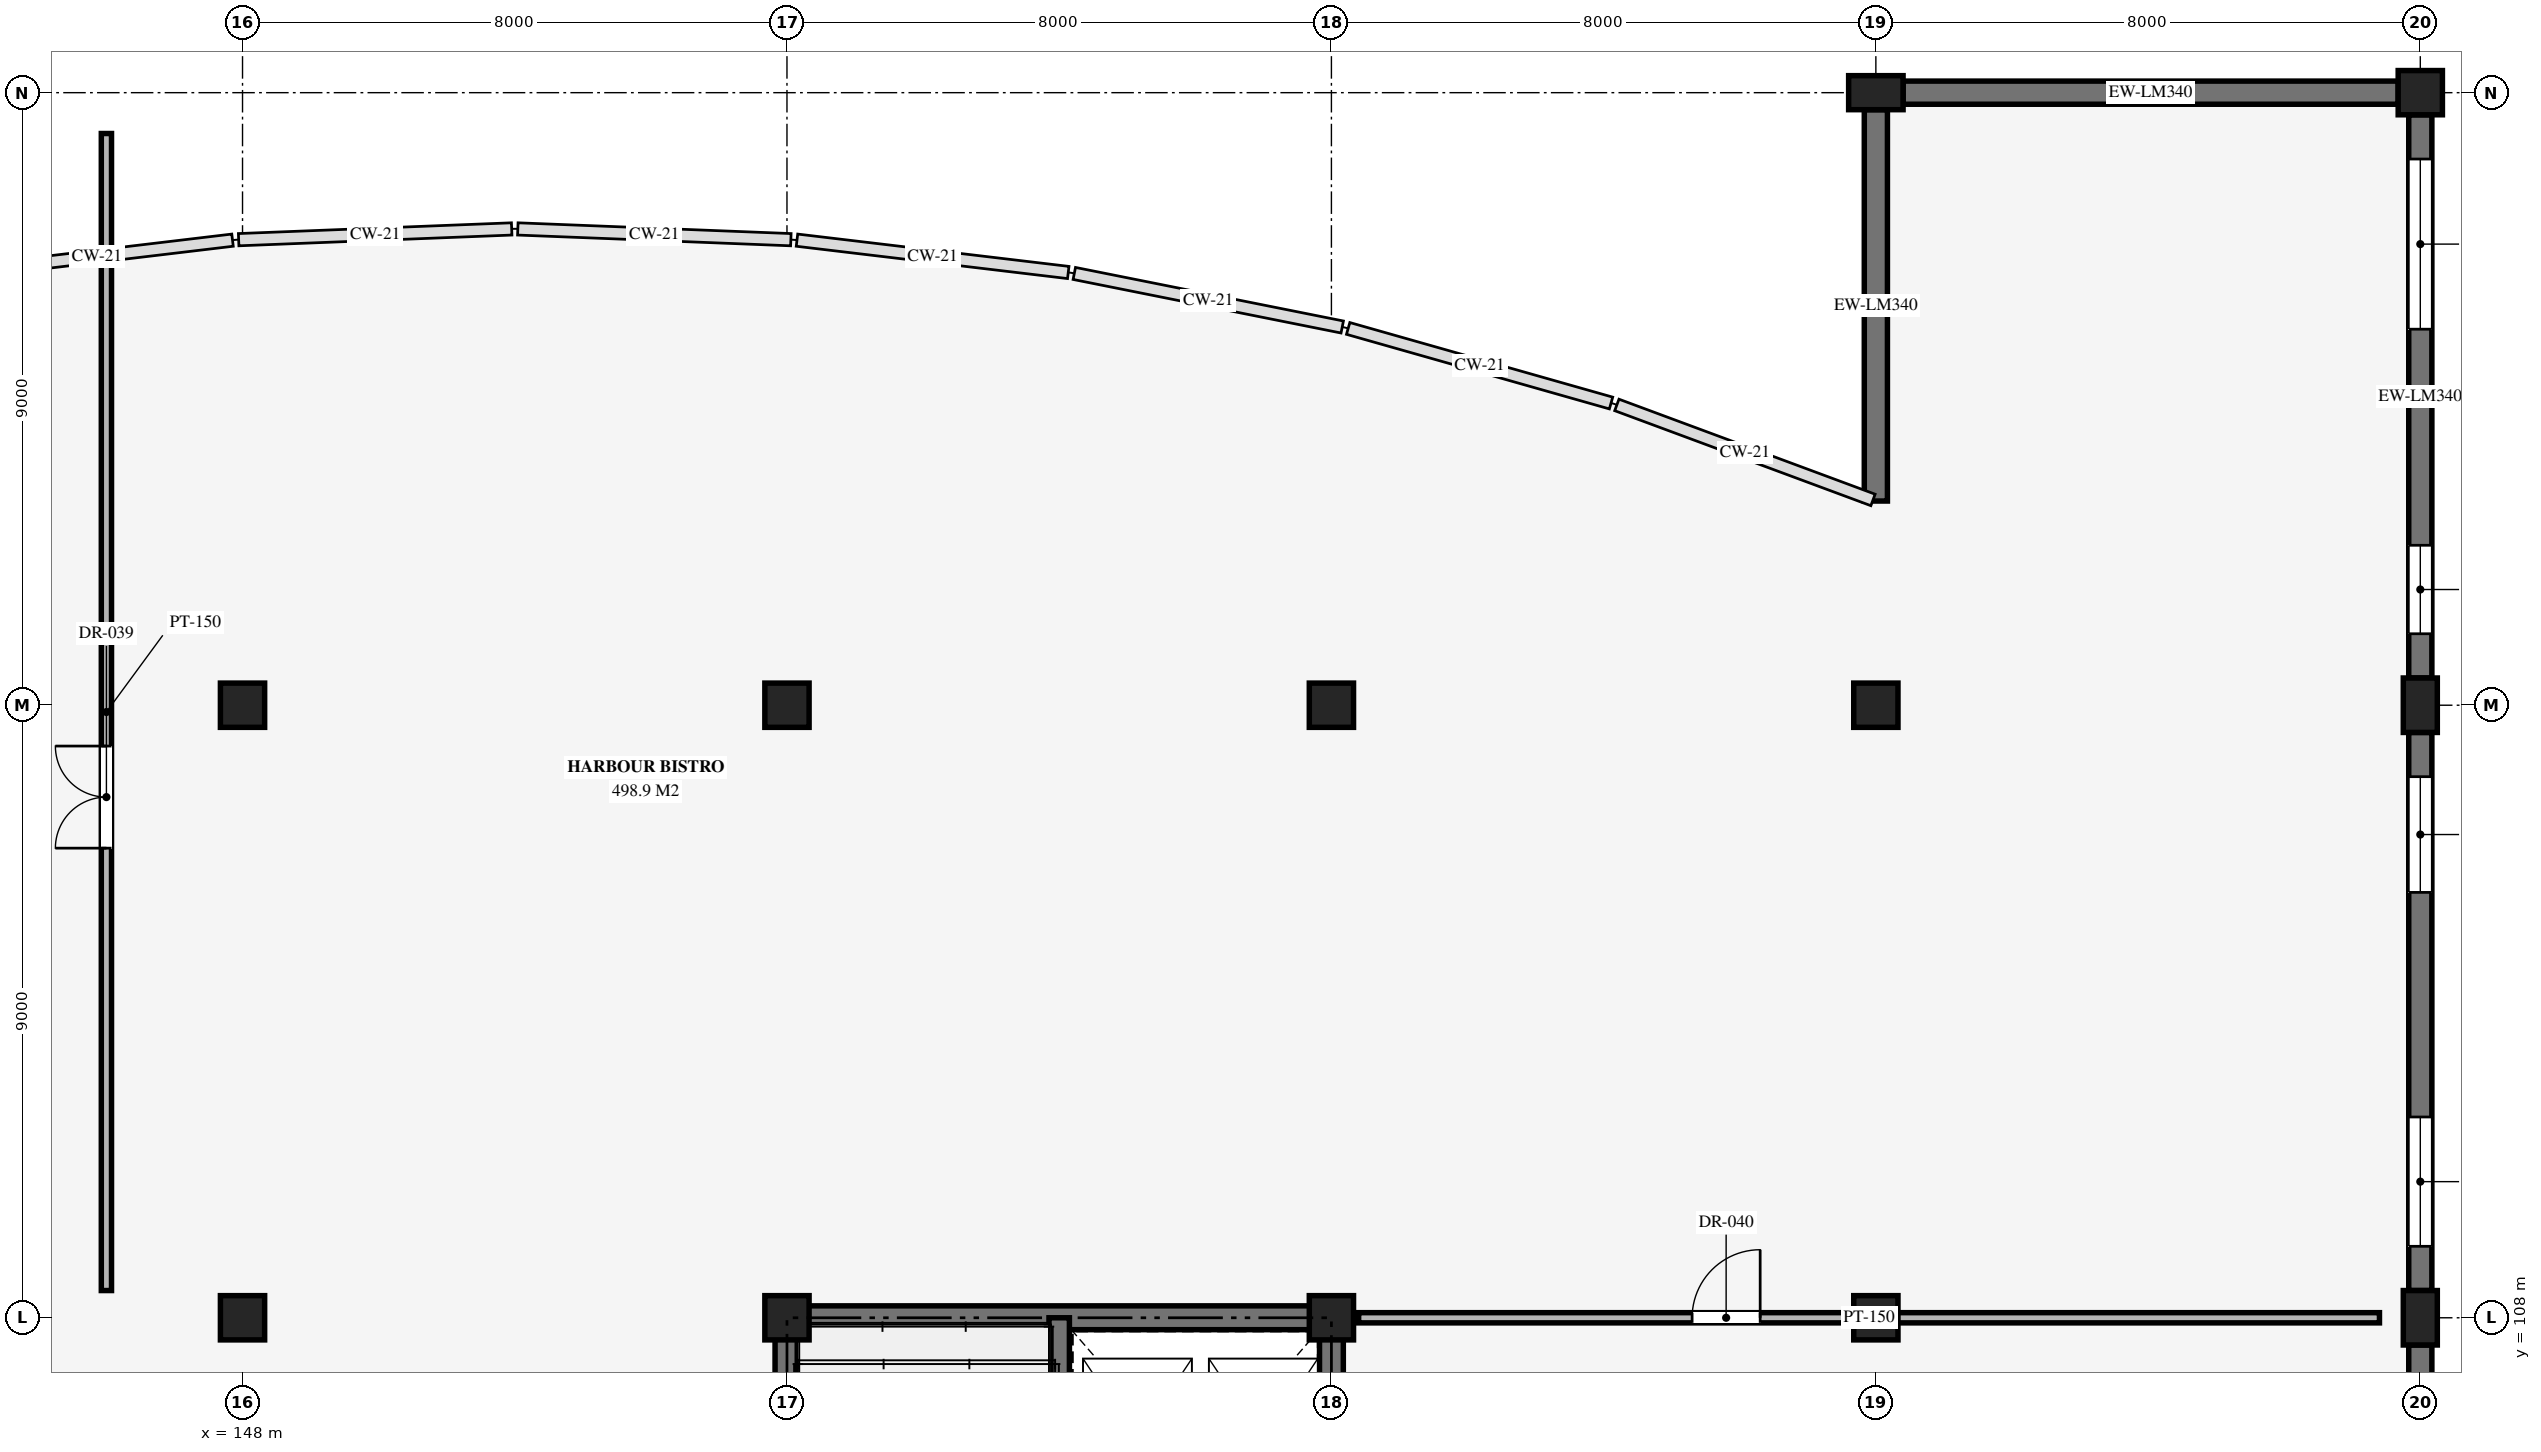
"""IFC4 building model, lengths in metres.
Left out: names, types, materials, properties, quantities, classifications, styles, units other than length and angle.
Written with IfcOpenShell. Run it as: python <this file> out.ifc"""

import sys

from ifc_helpers import new_model, si_unit, direction, frame, frame_2d, origin, origin_2d, place, context, subcontext, project, spatial, rectangle, extrude, element, fill, save


model = new_model("IFC4")
c1 = context("Model", 3, precision=1e-05, world=origin(), true_north=direction((0.0, 1.0)))
c2 = subcontext(c1, "Body", "Model", "MODEL_VIEW")
j1 = project(units=[si_unit("LENGTHUNIT", "METRE"), si_unit("PLANEANGLEUNIT", "RADIAN")], contexts=[c1])
p1 = place(None, origin())
s1 = spatial("IfcSite", under=j1, at=p1, CompositionType="ELEMENT")
p2 = place(p1, origin())
s2 = spatial("IfcBuilding", under=s1, at=p2, CompositionType="ELEMENT")
p3 = place(p2, frame((0.0, 0.0, 10.2)))
s3 = spatial("IfcBuildingStorey", under=s2, at=p3, CompositionType="ELEMENT", Elevation=10.2)
for number, where, z_axis, x_axis in (
    (1, (148.0, 108.0, 0.0), (0.0, 0.0, 1.0), (1.0, 0.0, 0.0)),
    (2, (148.0, 117.0, 0.0), (0.0, 0.0, 1.0), (1.0, 0.0, 0.0)),
    (3, (156.0, 108.0, 0.0), (0.0, 0.0, 1.0), (1.0, 0.0, 0.0)),
    (4, (156.0, 117.0, 0.0), (0.0, 0.0, 1.0), (1.0, 0.0, 0.0)),
    (5, (164.0, 108.0, 0.0), (0.0, 0.0, 1.0), (1.0, 0.0, 0.0)),
    (6, (164.0, 117.0, 0.0), (0.0, 0.0, 1.0), (1.0, 0.0, 0.0)),
    (7, (172.0, 108.0, 0.0), (0.0, 0.0, 1.0), (1.0, 0.0, 0.0)),
    (8, (172.0, 117.0, 0.0), (0.0, 0.0, 1.0), (1.0, 0.0, 0.0)),
):
    element("IfcColumn", number, at=place(p3, frame(where, z_axis=z_axis, x_axis=x_axis)), inside=s3, PredefinedType="COLUMN", context=c2, shape_type="SweptSolid", body=[
        extrude(rectangle(XDim=0.65, YDim=0.65, at=origin_2d()), origin(), (0.0, 0.0, 1.0), 4.64),
    ])
for number, where, z_axis, x_axis in (
    (9, (172.0, 126.0, 0.0), (0.0, 0.0, 1.0), (0.0, 1.0, 0.0)),
    (10, (180.0, 108.0, 0.0), (0.0, 0.0, 1.0), (1.0, 0.0, 0.0)),
    (11, (180.0, 117.0, 0.0), (0.0, 0.0, 1.0), (1.0, 0.0, 0.0)),
):
    element("IfcColumn", number, at=place(p3, frame(where, z_axis=z_axis, x_axis=x_axis)), inside=s3, PredefinedType="PILASTER", context=c2, shape_type="SweptSolid", body=[
        extrude(rectangle(XDim=0.5, YDim=0.8, at=origin_2d()), origin(), (0.0, 0.0, 1.0), 4.64),
    ])
p4 = place(p3, frame((180.0, 126.0, 0.0), z_axis=(0.0, 0.0, 1.0), x_axis=(1.0, 0.0, 0.0)))
e12 = element("IfcColumn", 12, at=p4, inside=s3, PredefinedType="COLUMN", context=c2, shape_type="SweptSolid", body=[
    extrude(rectangle(XDim=0.65, YDim=0.65, at=origin_2d()), origin(), (0.0, 0.0, 1.0), 4.64),
])
p5 = place(p3, frame((180.0, 99.4, 0.0), z_axis=(0.0, 0.0, 1.0), x_axis=(0.0, 1.0, 0.0)))
e13 = element("IfcWall", 13, at=p5, inside=s3, PredefinedType="SOLIDWALL", context=c2, shape_type="SweptSolid", body=[
    extrude(rectangle(XDim=8.2, YDim=0.34, at=frame_2d((4.1, 0.0))), origin(), (0.0, 0.0, 1.0), 4.52),
])
p6 = place(p5, frame((0.65, 0.0, 0.95)))
e14 = element("IfcOpeningElement", 14, at=p6, cuts=e13, PredefinedType="OPENING", context=c2, shape_type="SweptSolid", body=[
    extrude(rectangle(XDim=1.6, YDim=2.0, at=frame_2d((0.8, 1.0))), frame((0.0, 0.18, 0.0), z_axis=(0.0, -1.0, 0.0), x_axis=(1.0, 0.0, 0.0)), (0.0, 0.0, 1.0), 0.36),
])
p7 = place(p5, frame((5.35, 0.0, 0.95)))
e15 = element("IfcOpeningElement", 15, at=p7, cuts=e13, PredefinedType="OPENING", context=c2, shape_type="SweptSolid", body=[
    extrude(rectangle(XDim=2.2, YDim=1.9, at=frame_2d((1.1, 0.95))), frame((0.0, 0.18, 0.0), z_axis=(0.0, -1.0, 0.0), x_axis=(1.0, 0.0, 0.0)), (0.0, 0.0, 1.0), 0.36),
])
p8 = place(p3, frame((180.0, 108.4, 0.0), z_axis=(0.0, 0.0, 1.0), x_axis=(0.0, 1.0, 0.0)))
e16 = element("IfcWall", 16, at=p8, inside=s3, PredefinedType="SOLIDWALL", context=c2, shape_type="SweptSolid", body=[
    extrude(rectangle(XDim=8.2, YDim=0.34, at=frame_2d((4.1, 0.0))), origin(), (0.0, 0.0, 1.0), 4.52),
])
p9 = place(p8, frame((0.65, 0.0, 0.95)))
e17 = element("IfcOpeningElement", 17, at=p9, cuts=e16, PredefinedType="OPENING", context=c2, shape_type="SweptSolid", body=[
    extrude(rectangle(XDim=1.9, YDim=1.9, at=frame_2d((0.95, 0.95))), frame((0.0, 0.18, 0.0), z_axis=(0.0, -1.0, 0.0), x_axis=(1.0, 0.0, 0.0)), (0.0, 0.0, 1.0), 0.36),
])
p10 = place(p8, frame((5.85, 0.0, 0.95)))
e18 = element("IfcOpeningElement", 18, at=p10, cuts=e16, PredefinedType="OPENING", context=c2, shape_type="SweptSolid", body=[
    extrude(rectangle(XDim=1.7, YDim=1.7, at=frame_2d((0.85, 0.85))), frame((0.0, 0.18, 0.0), z_axis=(0.0, -1.0, 0.0), x_axis=(1.0, 0.0, 0.0)), (0.0, 0.0, 1.0), 0.36),
])
p11 = place(p3, frame((180.0, 117.4, 0.0), z_axis=(0.0, 0.0, 1.0), x_axis=(0.0, 1.0, 0.0)))
e19 = element("IfcWall", 19, at=p11, inside=s3, PredefinedType="SOLIDWALL", context=c2, shape_type="SweptSolid", body=[
    extrude(rectangle(XDim=8.275, YDim=0.34, at=frame_2d((4.138, 0.0))), origin(), (0.0, 0.0, 1.0), 4.52),
])
p12 = place(p11, frame((0.65, 0.0, 0.95)))
e20 = element("IfcOpeningElement", 20, at=p12, cuts=e19, PredefinedType="OPENING", context=c2, shape_type="SweptSolid", body=[
    extrude(rectangle(XDim=1.3, YDim=1.9, at=frame_2d((0.65, 0.95))), frame((0.0, 0.18, 0.0), z_axis=(0.0, -1.0, 0.0), x_axis=(1.0, 0.0, 0.0)), (0.0, 0.0, 1.0), 0.36),
])
p13 = place(p11, frame((5.125, 0.0, 0.95)))
e21 = element("IfcOpeningElement", 21, at=p13, cuts=e19, PredefinedType="OPENING", context=c2, shape_type="SweptSolid", body=[
    extrude(rectangle(XDim=2.5, YDim=1.7, at=frame_2d((1.25, 0.85))), frame((0.0, 0.18, 0.0), z_axis=(0.0, -1.0, 0.0), x_axis=(1.0, 0.0, 0.0)), (0.0, 0.0, 1.0), 0.36),
])
p14 = place(p3, frame((172.0, 120.0, 0.0), z_axis=(0.0, 0.0, 1.0), x_axis=(0.0, 1.0, 0.0)))
e22 = element("IfcWall", 22, at=p14, inside=s3, PredefinedType="SOLIDWALL", context=c2, shape_type="SweptSolid", body=[
    extrude(rectangle(XDim=5.75, YDim=0.34, at=frame_2d((2.875, 0.0))), origin(), (0.0, 0.0, 1.0), 4.52),
])
p15 = place(p3, frame((172.4, 126.0, 0.0), z_axis=(0.0, 0.0, 1.0), x_axis=(1.0, 0.0, 0.0)))
e23 = element("IfcWall", 23, at=p15, inside=s3, PredefinedType="SOLIDWALL", context=c2, shape_type="SweptSolid", body=[
    extrude(rectangle(XDim=7.275, YDim=0.34, at=frame_2d((3.638, 0.0))), origin(), (0.0, 0.0, 1.0), 4.52),
])
p16 = place(p3, frame((156.0, 108.0, 0.0), z_axis=(0.0, 0.0, 1.0), x_axis=(1.0, 0.0, 0.0)))
e24 = element("IfcWall", 24, at=p16, inside=s3, PredefinedType="SHEAR", context=c2, shape_type="SweptSolid", body=[
    extrude(rectangle(XDim=8.0, YDim=0.35, at=frame_2d((4.0, 0.0))), origin(), (0.0, 0.0, 1.0), 4.78),
])
p17 = place(p3, frame((156.0, 99.0, 0.0), z_axis=(0.0, 0.0, 1.0), x_axis=(0.0, 1.0, 0.0)))
e25 = element("IfcWall", 25, at=p17, inside=s3, PredefinedType="SHEAR", context=c2, shape_type="SweptSolid", body=[
    extrude(rectangle(XDim=9.0, YDim=0.35, at=frame_2d((4.5, 0.0))), origin(), (0.0, 0.0, 1.0), 4.78),
])
p18 = place(p3, frame((164.0, 99.0, 0.0), z_axis=(0.0, 0.0, 1.0), x_axis=(0.0, 1.0, 0.0)))
e26 = element("IfcWall", 26, at=p18, inside=s3, PredefinedType="SHEAR", context=c2, shape_type="SweptSolid", body=[
    extrude(rectangle(XDim=9.0, YDim=0.35, at=frame_2d((4.5, 0.0))), origin(), (0.0, 0.0, 1.0), 4.78),
])
p19 = place(p18, frame((1.4, 0.0, 0.0)))
e27 = element("IfcOpeningElement", 27, at=p19, cuts=e26, PredefinedType="OPENING", context=c2, shape_type="SweptSolid", body=[
    extrude(rectangle(XDim=1.5, YDim=2.2, at=frame_2d((0.75, 1.1))), frame((0.0, 0.185, 0.0), z_axis=(0.0, -1.0, 0.0), x_axis=(1.0, 0.0, 0.0)), (0.0, 0.0, 1.0), 0.37),
])
p20 = place(p3, frame((160.0, 108.0, 0.0), z_axis=(0.0, 0.0, 1.0), x_axis=(0.0, -1.0, 0.0)))
e28 = element("IfcWall", 28, at=p20, inside=s3, PredefinedType="SHEAR", context=c2, shape_type="SweptSolid", body=[
    extrude(rectangle(XDim=9.0, YDim=0.3, at=frame_2d((4.5, 0.0))), origin(), (0.0, 0.0, 1.0), 4.78),
])
p21 = place(p20, frame((7.45, 0.0, 0.0)))
e29 = element("IfcOpeningElement", 29, at=p21, cuts=e28, PredefinedType="OPENING", context=c2, shape_type="SweptSolid", body=[
    extrude(rectangle(XDim=1.05, YDim=2.15, at=frame_2d((0.525, 1.075))), frame((0.0, 0.16, 0.0), z_axis=(0.0, -1.0, 0.0), x_axis=(1.0, 0.0, 0.0)), (0.0, 0.0, 1.0), 0.32),
])
p22 = place(p3, frame((146.0, 108.4, 0.0), z_axis=(0.0, 0.0, 1.0), x_axis=(0.0, 1.0, 0.0)))
e30 = element("IfcWall", 30, at=p22, inside=s3, PredefinedType="PARTITIONING", context=c2, shape_type="SweptSolid", body=[
    extrude(rectangle(XDim=17.0, YDim=0.15, at=frame_2d((8.5, 0.0))), origin(), (0.0, 0.0, 1.0), 3.65),
])
p23 = place(p22, frame((6.5, 0.0, 0.0)))
e31 = element("IfcOpeningElement", 31, at=p23, cuts=e30, PredefinedType="OPENING", context=c2, shape_type="SweptSolid", body=[
    extrude(rectangle(XDim=1.5, YDim=2.2, at=frame_2d((0.75, 1.1))), frame((0.0, 0.085, 0.0), z_axis=(0.0, -1.0, 0.0), x_axis=(1.0, 0.0, 0.0)), (0.0, 0.0, 1.0), 0.17),
])
p24 = place(p3, frame((164.4, 108.0, 0.0), z_axis=(0.0, 0.0, 1.0), x_axis=(1.0, 0.0, 0.0)))
e32 = element("IfcWall", 32, at=p24, inside=s3, PredefinedType="PARTITIONING", context=c2, shape_type="SweptSolid", body=[
    extrude(rectangle(XDim=15.0, YDim=0.15, at=frame_2d((7.5, 0.0))), origin(), (0.0, 0.0, 1.0), 3.65),
])
p25 = place(p24, frame((4.9, 0.0, 0.0)))
e33 = element("IfcOpeningElement", 33, at=p25, cuts=e32, PredefinedType="OPENING", context=c2, shape_type="SweptSolid", body=[
    extrude(rectangle(XDim=1.0, YDim=2.15, at=frame_2d((0.5, 1.075))), frame((0.0, 0.085, 0.0), z_axis=(0.0, -1.0, 0.0), x_axis=(1.0, 0.0, 0.0)), (0.0, 0.0, 1.0), 0.17),
])
p26 = place(p9, origin())
e34 = element("IfcWindow", 34, at=p26, inside=s3, PartitioningType="SINGLE_PANEL", PredefinedType="WINDOW", context=c2, shape_type="SweptSolid", body=[
    extrude(rectangle(XDim=1.9, YDim=1.9, at=frame_2d((0.95, 0.95))), frame((0.0, 0.03, 0.0), z_axis=(0.0, -1.0, 0.0), x_axis=(1.0, 0.0, 0.0)), (0.0, 0.0, 1.0), 0.06),
])
fill(e17, e34)
p27 = place(p10, origin())
e35 = element("IfcWindow", 35, at=p27, inside=s3, PartitioningType="SINGLE_PANEL", PredefinedType="WINDOW", context=c2, shape_type="SweptSolid", body=[
    extrude(rectangle(XDim=1.7, YDim=1.7, at=frame_2d((0.85, 0.85))), frame((0.0, 0.03, 0.0), z_axis=(0.0, -1.0, 0.0), x_axis=(1.0, 0.0, 0.0)), (0.0, 0.0, 1.0), 0.06),
])
fill(e18, e35)
p28 = place(p12, origin())
e36 = element("IfcWindow", 36, at=p28, inside=s3, PartitioningType="SINGLE_PANEL", PredefinedType="WINDOW", context=c2, shape_type="SweptSolid", body=[
    extrude(rectangle(XDim=1.3, YDim=1.9, at=frame_2d((0.65, 0.95))), frame((0.0, 0.03, 0.0), z_axis=(0.0, -1.0, 0.0), x_axis=(1.0, 0.0, 0.0)), (0.0, 0.0, 1.0), 0.06),
])
fill(e20, e36)
p29 = place(p13, origin())
e37 = element("IfcWindow", 37, at=p29, inside=s3, PartitioningType="SINGLE_PANEL", PredefinedType="WINDOW", context=c2, shape_type="SweptSolid", body=[
    extrude(rectangle(XDim=2.5, YDim=1.7, at=frame_2d((1.25, 0.85))), frame((0.0, 0.03, 0.0), z_axis=(0.0, -1.0, 0.0), x_axis=(1.0, 0.0, 0.0)), (0.0, 0.0, 1.0), 0.06),
])
fill(e21, e37)
p30 = place(p23, origin())
e38 = element("IfcDoor", 38, at=p30, inside=s3, OperationType="DOUBLE_DOOR_SINGLE_SWING", PredefinedType="DOOR", context=c2, shape_type="SweptSolid", body=[
    extrude(rectangle(XDim=1.5, YDim=2.2, at=frame_2d((0.75, 1.1))), frame((0.0, 0.025, 0.0), z_axis=(0.0, -1.0, 0.0), x_axis=(1.0, 0.0, 0.0)), (0.0, 0.0, 1.0), 0.05),
])
fill(e31, e38)
p31 = place(p25, origin())
e39 = element("IfcDoor", 39, at=p31, inside=s3, OperationType="SINGLE_SWING_RIGHT", PredefinedType="DOOR", context=c2, shape_type="SweptSolid", body=[
    extrude(rectangle(XDim=1.0, YDim=2.15, at=frame_2d((0.5, 1.075))), frame((0.0, 0.025, 0.0), z_axis=(0.0, -1.0, 0.0), x_axis=(1.0, 0.0, 0.0)), (0.0, 0.0, 1.0), 0.05),
])
fill(e33, e39)
save(model, sys.argv[1])
